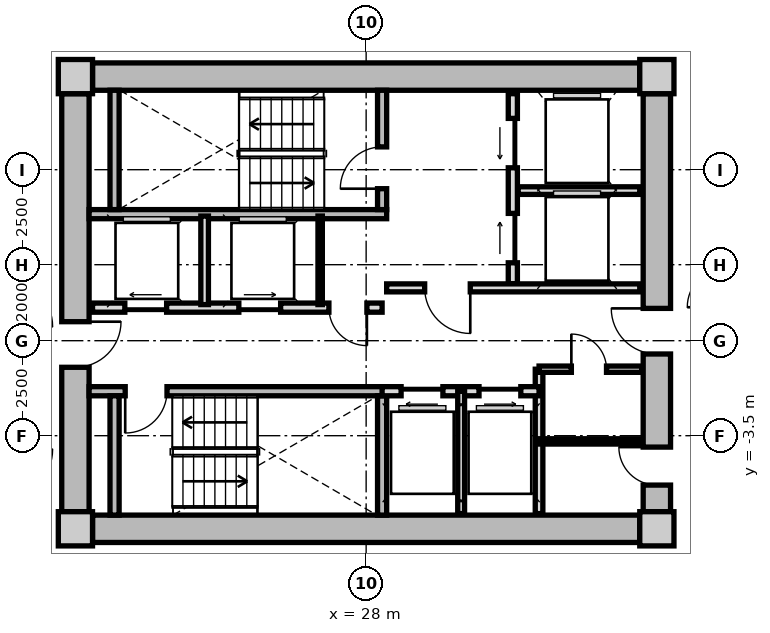
"""IFC4 building model, lengths in metres.
Left out: names, types, materials, properties, quantities, classifications, styles, units other than length and angle.
Written with IfcOpenShell. Run it as: python <this file> out.ifc"""

import sys

from ifc_helpers import new_model, si_unit, direction, frame, frame_2d, origin, origin_2d, place, context, subcontext, project, spatial, rectangle, extrude, source, transform, mapped, element, fill, save


model = new_model("IFC4")
c1 = context("Model", 3, precision=1e-05, world=origin(), true_north=direction((0.0, 1.0)))
c2 = subcontext(c1, "Body", "Model", "MODEL_VIEW")
j1 = project(units=[si_unit("LENGTHUNIT", "METRE"), si_unit("PLANEANGLEUNIT", "RADIAN")], contexts=[c1])
p1 = place(None, origin())
s1 = spatial("IfcSite", under=j1, at=p1, CompositionType="ELEMENT")
p2 = place(p1, origin())
s2 = spatial("IfcBuilding", under=s1, at=p2, CompositionType="ELEMENT")
p3 = place(p2, frame((0.0, 0.0, 77.95)))
s3 = spatial("IfcBuildingStorey", under=s2, at=p3, CompositionType="ELEMENT", Elevation=77.95)
m1 = source(origin(), c2, "Body", "SweptSolid", [
    extrude(rectangle(XDim=0.9, YDim=0.9, at=origin_2d()), origin(), (0.0, 0.0, 1.0), 3.05),
])
for number, where, z_axis, x_axis in (
    (1, (20.35, -5.95, 0.0), (0.0, 0.0, 1.0), (1.0, 0.0, 0.0)),
    (2, (35.65, -5.95, 0.0), (0.0, 0.0, 1.0), (1.0, 0.0, 0.0)),
    (3, (35.65, 5.95, 0.0), (0.0, 0.0, 1.0), (1.0, 0.0, 0.0)),
    (4, (20.35, 5.95, 0.0), (0.0, 0.0, 1.0), (1.0, 0.0, 0.0)),
):
    element("IfcColumn", number, at=place(p3, frame(where, z_axis=z_axis, x_axis=x_axis)), inside=s3, PredefinedType="COLUMN", context=c2, shape_type="MappedRepresentation", body=[
        mapped(m1, transform((0.0, 0.0, 0.0), x_axis=(1.0, 0.0, 0.0), y_axis=(0.0, 1.0, 0.0), z_axis=(0.0, 0.0, 1.0), scale=1.0)),
    ])
m2 = source(origin(), c2, "Body", "SweptSolid", [
    extrude(rectangle(XDim=14.4, YDim=0.72, at=frame_2d((7.2, 0.0))), origin(), (0.0, 0.0, 1.0), 2.79),
])
for number, where, z_axis, x_axis in (
    (5, (20.8, 5.95, 0.0), (0.0, 0.0, 1.0), (1.0, 0.0, 0.0)),
    (6, (35.2, -5.95, 0.0), (0.0, 0.0, 1.0), (-1.0, 0.0, 0.0)),
):
    element("IfcWall", number, at=place(p3, frame(where, z_axis=z_axis, x_axis=x_axis)), inside=s3, PredefinedType="SHEAR", context=c2, shape_type="MappedRepresentation", body=[
        mapped(m2, transform((0.0, 0.0, 0.0), x_axis=(1.0, 0.0, 0.0), y_axis=(0.0, 1.0, 0.0), z_axis=(0.0, 0.0, 1.0), scale=1.0)),
    ])
m3 = source(origin(), c2, "Body", "SweptSolid", [
    extrude(rectangle(XDim=11.0, YDim=0.72, at=frame_2d((5.5, 0.0))), origin(), (0.0, 0.0, 1.0), 2.79),
])
p4 = place(p3, frame((20.35, -5.5, 0.0), z_axis=(0.0, 0.0, 1.0), x_axis=(0.0, 1.0, 0.0)))
e7 = element("IfcWall", 7, at=p4, inside=s3, PredefinedType="SHEAR", context=c2, shape_type="MappedRepresentation", body=[
    mapped(m3, transform((0.0, 0.0, 0.0), x_axis=(1.0, 0.0, 0.0), y_axis=(0.0, 1.0, 0.0), z_axis=(0.0, 0.0, 1.0), scale=1.0)),
])
p5 = place(p4, frame((3.8, 0.0, 0.0)))
e8 = element("IfcOpeningElement", 8, at=p5, cuts=e7, PredefinedType="OPENING", context=c2, shape_type="SweptSolid", body=[
    extrude(rectangle(XDim=1.2, YDim=2.15, at=frame_2d((0.6, 1.075))), frame((0.0, 0.37, 0.0), z_axis=(0.0, -1.0, 0.0), x_axis=(1.0, 0.0, 0.0)), (0.0, 0.0, 1.0), 0.74),
])
p6 = place(p3, frame((35.65, 5.5, 0.0), z_axis=(0.0, 0.0, 1.0), x_axis=(0.0, -1.0, 0.0)))
e9 = element("IfcWall", 9, at=p6, inside=s3, PredefinedType="SHEAR", context=c2, shape_type="MappedRepresentation", body=[
    mapped(m3, transform((0.0, 0.0, 0.0), x_axis=(1.0, 0.0, 0.0), y_axis=(0.0, 1.0, 0.0), z_axis=(0.0, 0.0, 1.0), scale=1.0)),
])
p7 = place(p6, frame((5.65, 0.0, 0.0)))
e10 = element("IfcOpeningElement", 10, at=p7, cuts=e9, PredefinedType="OPENING", context=c2, shape_type="SweptSolid", body=[
    extrude(rectangle(XDim=1.2, YDim=2.15, at=frame_2d((0.6, 1.075))), frame((0.0, 0.37, 0.0), z_axis=(0.0, -1.0, 0.0), x_axis=(1.0, 0.0, 0.0)), (0.0, 0.0, 1.0), 0.74),
])
p8 = place(p6, frame((9.3, 0.0, 0.0)))
e11 = element("IfcOpeningElement", 11, at=p8, cuts=e9, PredefinedType="OPENING", context=c2, shape_type="SweptSolid", body=[
    extrude(rectangle(XDim=1.0, YDim=2.1, at=frame_2d((0.5, 1.05))), frame((0.0, 0.37, 0.0), z_axis=(0.0, -1.0, 0.0), x_axis=(1.0, 0.0, 0.0)), (0.0, 0.0, 1.0), 0.74),
])
m4 = source(origin(), c2, "Body", "SweptSolid", [
    extrude(rectangle(XDim=7.83, YDim=0.24, at=frame_2d((3.915, 0.0))), origin(), (0.0, 0.0, 1.0), 2.79),
])
p9 = place(p3, frame((20.71, 2.33, 0.0), z_axis=(0.0, 0.0, 1.0), x_axis=(1.0, 0.0, 0.0)))
e12 = element("IfcWall", 12, at=p9, inside=s3, PredefinedType="PARTITIONING", context=c2, shape_type="MappedRepresentation", body=[
    mapped(m4, transform((0.0, 0.0, 0.0), x_axis=(1.0, 0.0, 0.0), y_axis=(0.0, 1.0, 0.0), z_axis=(0.0, 0.0, 1.0), scale=1.0)),
])
m5 = source(origin(), c2, "Body", "SweptSolid", [
    extrude(rectangle(XDim=3.14, YDim=0.24, at=frame_2d((1.57, 0.0))), origin(), (0.0, 0.0, 1.0), 2.79),
])
p10 = place(p3, frame((21.38, 2.45, 0.0), z_axis=(0.0, 0.0, 1.0), x_axis=(0.0, 1.0, 0.0)))
e13 = element("IfcWall", 13, at=p10, inside=s3, PredefinedType="PARTITIONING", context=c2, shape_type="MappedRepresentation", body=[
    mapped(m5, transform((0.0, 0.0, 0.0), x_axis=(1.0, 0.0, 0.0), y_axis=(0.0, 1.0, 0.0), z_axis=(0.0, 0.0, 1.0), scale=1.0)),
])
p11 = place(p3, frame((28.42, 2.45, 0.0), z_axis=(0.0, 0.0, 1.0), x_axis=(0.0, 1.0, 0.0)))
e14 = element("IfcWall", 14, at=p11, inside=s3, PredefinedType="PARTITIONING", context=c2, shape_type="MappedRepresentation", body=[
    mapped(m5, transform((0.0, 0.0, 0.0), x_axis=(1.0, 0.0, 0.0), y_axis=(0.0, 1.0, 0.0), z_axis=(0.0, 0.0, 1.0), scale=1.0)),
])
p12 = place(p11, frame((0.55, 0.0, 0.0)))
e15 = element("IfcOpeningElement", 15, at=p12, cuts=e14, PredefinedType="OPENING", context=c2, shape_type="SweptSolid", body=[
    extrude(rectangle(XDim=1.1, YDim=2.15, at=frame_2d((0.55, 1.075))), frame((0.0, 0.13, 0.0), z_axis=(0.0, -1.0, 0.0), x_axis=(1.0, 0.0, 0.0)), (0.0, 0.0, 1.0), 0.26),
])
p13 = place(p3, frame((20.71, -2.33, 0.0), z_axis=(0.0, 0.0, 1.0), x_axis=(1.0, 0.0, 0.0)))
e16 = element("IfcWall", 16, at=p13, inside=s3, PredefinedType="PARTITIONING", context=c2, shape_type="MappedRepresentation", body=[
    mapped(m4, transform((0.0, 0.0, 0.0), x_axis=(1.0, 0.0, 0.0), y_axis=(0.0, 1.0, 0.0), z_axis=(0.0, 0.0, 1.0), scale=1.0)),
])
p14 = place(p13, frame((0.95, 0.0, 0.0)))
e17 = element("IfcOpeningElement", 17, at=p14, cuts=e16, PredefinedType="OPENING", context=c2, shape_type="SweptSolid", body=[
    extrude(rectangle(XDim=1.1, YDim=2.15, at=frame_2d((0.55, 1.075))), frame((0.0, 0.13, 0.0), z_axis=(0.0, -1.0, 0.0), x_axis=(1.0, 0.0, 0.0)), (0.0, 0.0, 1.0), 0.26),
])
for number, where, z_axis, x_axis in (
    (18, (21.38, -5.59, 0.0), (0.0, 0.0, 1.0), (0.0, 1.0, 0.0)),
    (19, (28.42, -5.59, 0.0), (0.0, 0.0, 1.0), (0.0, 1.0, 0.0)),
):
    element("IfcWall", number, at=place(p3, frame(where, z_axis=z_axis, x_axis=x_axis)), inside=s3, PredefinedType="PARTITIONING", context=c2, shape_type="MappedRepresentation", body=[
        mapped(m5, transform((0.0, 0.0, 0.0), x_axis=(1.0, 0.0, 0.0), y_axis=(0.0, 1.0, 0.0), z_axis=(0.0, 0.0, 1.0), scale=1.0)),
    ])
m6 = source(origin(), c2, "Body", "SweptSolid", [
    extrude(rectangle(XDim=5.0, YDim=0.24, at=frame_2d((2.5, 0.0))), origin(), (0.0, 0.0, 1.0), 2.775),
])
p15 = place(p3, frame((31.86, 0.5, 0.0), z_axis=(0.0, 0.0, 1.0), x_axis=(0.0, 1.0, 0.0)))
e20 = element("IfcWall", 20, at=p15, inside=s3, PredefinedType="PARTITIONING", context=c2, shape_type="MappedRepresentation", body=[
    mapped(m6, transform((0.0, 0.0, 0.0), x_axis=(1.0, 0.0, 0.0), y_axis=(0.0, 1.0, 0.0), z_axis=(0.0, 0.0, 1.0), scale=1.0)),
])
p16 = place(p15, frame((3.05, 0.0, 0.0)))
e21 = element("IfcOpeningElement", 21, at=p16, cuts=e20, PredefinedType="OPENING", context=c2, shape_type="SweptSolid", body=[
    extrude(rectangle(XDim=1.3, YDim=2.2, at=frame_2d((0.65, 1.1))), frame((0.0, 0.13, 0.0), z_axis=(0.0, -1.0, 0.0), x_axis=(1.0, 0.0, 0.0)), (0.0, 0.0, 1.0), 0.26),
])
p17 = place(p15, frame((0.55, 0.0, 0.0)))
e22 = element("IfcOpeningElement", 22, at=p17, cuts=e20, PredefinedType="OPENING", context=c2, shape_type="SweptSolid", body=[
    extrude(rectangle(XDim=1.3, YDim=2.2, at=frame_2d((0.65, 1.1))), frame((0.0, 0.13, 0.0), z_axis=(0.0, -1.0, 0.0), x_axis=(1.0, 0.0, 0.0)), (0.0, 0.0, 1.0), 0.26),
])
m7 = source(origin(), c2, "Body", "SweptSolid", [
    extrude(rectangle(XDim=3.2, YDim=0.2, at=frame_2d((1.6, 0.0))), origin(), (0.0, 0.0, 1.0), 2.775),
])
p18 = place(p3, frame((32.0, 2.95, 0.0), z_axis=(0.0, 0.0, 1.0), x_axis=(1.0, 0.0, 0.0)))
e23 = element("IfcWall", 23, at=p18, inside=s3, PredefinedType="PARTITIONING", context=c2, shape_type="MappedRepresentation", body=[
    mapped(m7, transform((0.0, 0.0, 0.0), x_axis=(1.0, 0.0, 0.0), y_axis=(0.0, 1.0, 0.0), z_axis=(0.0, 0.0, 1.0), scale=1.0)),
])
m8 = source(origin(), c2, "Body", "SweptSolid", [
    extrude(rectangle(XDim=6.66, YDim=0.21, at=frame_2d((3.33, 0.0))), origin(), (0.0, 0.0, 1.0), 2.775),
])
p19 = place(p3, frame((28.54, 0.39, 0.0), z_axis=(0.0, 0.0, 1.0), x_axis=(1.0, 0.0, 0.0)))
e24 = element("IfcWall", 24, at=p19, inside=s3, PredefinedType="PARTITIONING", context=c2, shape_type="MappedRepresentation", body=[
    mapped(m8, transform((0.0, 0.0, 0.0), x_axis=(1.0, 0.0, 0.0), y_axis=(0.0, 1.0, 0.0), z_axis=(0.0, 0.0, 1.0), scale=1.0)),
])
p20 = place(p19, frame((1.0, 0.0, 0.0)))
e25 = element("IfcOpeningElement", 25, at=p20, cuts=e24, PredefinedType="OPENING", context=c2, shape_type="SweptSolid", body=[
    extrude(rectangle(XDim=1.2, YDim=2.15, at=frame_2d((0.6, 1.075))), frame((0.0, 0.115, 0.0), z_axis=(0.0, -1.0, 0.0), x_axis=(1.0, 0.0, 0.0)), (0.0, 0.0, 1.0), 0.23),
])
m9 = source(origin(), c2, "Body", "SweptSolid", [
    extrude(rectangle(XDim=7.62, YDim=0.24, at=frame_2d((3.81, 0.0))), origin(), (0.0, 0.0, 1.0), 2.775),
])
p21 = place(p3, frame((20.8, -0.13, 0.0), z_axis=(0.0, 0.0, 1.0), x_axis=(1.0, 0.0, 0.0)))
e26 = element("IfcWall", 26, at=p21, inside=s3, PredefinedType="PARTITIONING", context=c2, shape_type="MappedRepresentation", body=[
    mapped(m9, transform((0.0, 0.0, 0.0), x_axis=(1.0, 0.0, 0.0), y_axis=(0.0, 1.0, 0.0), z_axis=(0.0, 0.0, 1.0), scale=1.0)),
])
p22 = place(p21, frame((6.22, 0.0, 0.0)))
e27 = element("IfcOpeningElement", 27, at=p22, cuts=e26, PredefinedType="OPENING", context=c2, shape_type="SweptSolid", body=[
    extrude(rectangle(XDim=1.0, YDim=2.1, at=frame_2d((0.5, 1.05))), frame((0.0, 0.13, 0.0), z_axis=(0.0, -1.0, 0.0), x_axis=(1.0, 0.0, 0.0)), (0.0, 0.0, 1.0), 0.26),
])
p23 = place(p21, frame((0.85, 0.0, 0.0)))
e28 = element("IfcOpeningElement", 28, at=p23, cuts=e26, PredefinedType="OPENING", context=c2, shape_type="SweptSolid", body=[
    extrude(rectangle(XDim=1.1, YDim=2.2, at=frame_2d((0.55, 1.1))), frame((0.0, 0.13, 0.0), z_axis=(0.0, -1.0, 0.0), x_axis=(1.0, 0.0, 0.0)), (0.0, 0.0, 1.0), 0.26),
])
p24 = place(p21, frame((3.85, 0.0, 0.0)))
e29 = element("IfcOpeningElement", 29, at=p24, cuts=e26, PredefinedType="OPENING", context=c2, shape_type="SweptSolid", body=[
    extrude(rectangle(XDim=1.1, YDim=2.2, at=frame_2d((0.55, 1.1))), frame((0.0, 0.13, 0.0), z_axis=(0.0, -1.0, 0.0), x_axis=(1.0, 0.0, 0.0)), (0.0, 0.0, 1.0), 0.26),
])
m10 = source(origin(), c2, "Body", "SweptSolid", [
    extrude(rectangle(XDim=2.33, YDim=0.115, at=frame_2d((1.165, 0.0))), origin(), (0.0, 0.0, 1.0), 2.775),
])
p25 = place(p3, frame((26.79, -0.05, 0.0), z_axis=(0.0, 0.0, 1.0), x_axis=(0.0, 1.0, 0.0)))
e30 = element("IfcWall", 30, at=p25, inside=s3, PredefinedType="PARTITIONING", context=c2, shape_type="MappedRepresentation", body=[
    mapped(m10, transform((0.0, 0.0, 0.0), x_axis=(1.0, 0.0, 0.0), y_axis=(0.0, 1.0, 0.0), z_axis=(0.0, 0.0, 1.0), scale=1.0)),
])
m11 = source(origin(), c2, "Body", "SweptSolid", [
    extrude(rectangle(XDim=2.33, YDim=0.2, at=frame_2d((1.165, 0.0))), origin(), (0.0, 0.0, 1.0), 2.775),
])
p26 = place(p3, frame((23.75, -0.05, 0.0), z_axis=(0.0, 0.0, 1.0), x_axis=(0.0, 1.0, 0.0)))
e31 = element("IfcWall", 31, at=p26, inside=s3, PredefinedType="PARTITIONING", context=c2, shape_type="MappedRepresentation", body=[
    mapped(m11, transform((0.0, 0.0, 0.0), x_axis=(1.0, 0.0, 0.0), y_axis=(0.0, 1.0, 0.0), z_axis=(0.0, 0.0, 1.0), scale=1.0)),
])
m12 = source(origin(), c2, "Body", "SweptSolid", [
    extrude(rectangle(XDim=3.8, YDim=0.2, at=frame_2d((1.9, 0.0))), origin(), (0.0, 0.0, 1.0), 2.775),
])
p27 = place(p3, frame((32.55, -5.55, 0.0), z_axis=(0.0, 0.0, 1.0), x_axis=(0.0, 1.0, 0.0)))
e32 = element("IfcWall", 32, at=p27, inside=s3, PredefinedType="PARTITIONING", context=c2, shape_type="MappedRepresentation", body=[
    mapped(m12, transform((0.0, 0.0, 0.0), x_axis=(1.0, 0.0, 0.0), y_axis=(0.0, 1.0, 0.0), z_axis=(0.0, 0.0, 1.0), scale=1.0)),
])
m13 = source(origin(), c2, "Body", "SweptSolid", [
    extrude(rectangle(XDim=4.13, YDim=0.24, at=frame_2d((2.065, 0.0))), origin(), (0.0, 0.0, 1.0), 2.775),
])
p28 = place(p3, frame((28.42, -2.33, 0.0), z_axis=(0.0, 0.0, 1.0), x_axis=(1.0, 0.0, 0.0)))
e33 = element("IfcWall", 33, at=p28, inside=s3, PredefinedType="PARTITIONING", context=c2, shape_type="MappedRepresentation", body=[
    mapped(m13, transform((0.0, 0.0, 0.0), x_axis=(1.0, 0.0, 0.0), y_axis=(0.0, 1.0, 0.0), z_axis=(0.0, 0.0, 1.0), scale=1.0)),
])
p29 = place(p28, frame((0.5, 0.0, 0.0)))
e34 = element("IfcOpeningElement", 34, at=p29, cuts=e33, PredefinedType="OPENING", context=c2, shape_type="SweptSolid", body=[
    extrude(rectangle(XDim=1.1, YDim=2.2, at=frame_2d((0.55, 1.1))), frame((0.0, 0.13, 0.0), z_axis=(0.0, -1.0, 0.0), x_axis=(1.0, 0.0, 0.0)), (0.0, 0.0, 1.0), 0.26),
])
p30 = place(p28, frame((2.55, 0.0, 0.0)))
e35 = element("IfcOpeningElement", 35, at=p30, cuts=e33, PredefinedType="OPENING", context=c2, shape_type="SweptSolid", body=[
    extrude(rectangle(XDim=1.1, YDim=2.2, at=frame_2d((0.55, 1.1))), frame((0.0, 0.13, 0.0), z_axis=(0.0, -1.0, 0.0), x_axis=(1.0, 0.0, 0.0)), (0.0, 0.0, 1.0), 0.26),
])
m14 = source(origin(), c2, "Body", "SweptSolid", [
    extrude(rectangle(XDim=3.22, YDim=0.18, at=frame_2d((1.61, 0.0))), origin(), (0.0, 0.0, 1.0), 2.775),
])
p31 = place(p3, frame((30.5, -5.55, 0.0), z_axis=(0.0, 0.0, 1.0), x_axis=(0.0, 1.0, 0.0)))
e36 = element("IfcWall", 36, at=p31, inside=s3, PredefinedType="PARTITIONING", context=c2, shape_type="MappedRepresentation", body=[
    mapped(m14, transform((0.0, 0.0, 0.0), x_axis=(1.0, 0.0, 0.0), y_axis=(0.0, 1.0, 0.0), z_axis=(0.0, 0.0, 1.0), scale=1.0)),
])
m15 = source(origin(), c2, "Body", "SweptSolid", [
    extrude(rectangle(XDim=2.7, YDim=0.165, at=frame_2d((1.35, 0.0))), origin(), (0.0, 0.0, 1.0), 2.775),
])
p32 = place(p3, frame((32.55, -1.75, 0.0), z_axis=(0.0, 0.0, 1.0), x_axis=(1.0, 0.0, 0.0)))
e37 = element("IfcWall", 37, at=p32, inside=s3, PredefinedType="PARTITIONING", context=c2, shape_type="MappedRepresentation", body=[
    mapped(m15, transform((0.0, 0.0, 0.0), x_axis=(1.0, 0.0, 0.0), y_axis=(0.0, 1.0, 0.0), z_axis=(0.0, 0.0, 1.0), scale=1.0)),
])
p33 = place(p32, frame((0.85, 0.0, 0.0)))
e38 = element("IfcOpeningElement", 38, at=p33, cuts=e37, PredefinedType="OPENING", context=c2, shape_type="SweptSolid", body=[
    extrude(rectangle(XDim=0.925, YDim=2.1, at=frame_2d((0.462, 1.05))), frame((0.0, 0.093, 0.0), z_axis=(0.0, -1.0, 0.0), x_axis=(1.0, 0.0, 0.0)), (0.0, 0.0, 1.0), 0.185),
])
m16 = source(origin(), c2, "Body", "SweptSolid", [
    extrude(rectangle(XDim=2.7, YDim=0.14, at=frame_2d((1.35, 0.0))), origin(), (0.0, 0.0, 1.0), 2.775),
])
p34 = place(p3, frame((32.55, -3.65, 0.0), z_axis=(0.0, 0.0, 1.0), x_axis=(1.0, 0.0, 0.0)))
e39 = element("IfcWall", 39, at=p34, inside=s3, PredefinedType="PARTITIONING", context=c2, shape_type="MappedRepresentation", body=[
    mapped(m16, transform((0.0, 0.0, 0.0), x_axis=(1.0, 0.0, 0.0), y_axis=(0.0, 1.0, 0.0), z_axis=(0.0, 0.0, 1.0), scale=1.0)),
])
m17 = source(origin(), c2, "Body", "SweptSolid", [
    extrude(rectangle(XDim=1.1, YDim=2.15, at=frame_2d((0.55, 1.075))), frame((0.0, 0.025, 0.0), z_axis=(0.0, -1.0, 0.0), x_axis=(1.0, 0.0, 0.0)), (0.0, 0.0, 1.0), 0.05),
])
p35 = place(p12, origin())
e40 = element("IfcDoor", 40, at=p35, inside=s3, OperationType="SINGLE_SWING_LEFT", PredefinedType="DOOR", context=c2, shape_type="MappedRepresentation", body=[
    mapped(m17, transform((0.0, 0.0, 0.0), x_axis=(1.0, 0.0, 0.0), y_axis=(0.0, 1.0, 0.0), z_axis=(0.0, 0.0, 1.0), scale=1.0)),
])
fill(e15, e40)
p36 = place(p14, frame((1.1, 0.0, 0.0), z_axis=(0.0, 0.0, 1.0), x_axis=(-1.0, 0.0, 0.0)))
e41 = element("IfcDoor", 41, at=p36, inside=s3, OperationType="SINGLE_SWING_RIGHT", PredefinedType="DOOR", context=c2, shape_type="MappedRepresentation", body=[
    mapped(m17, transform((0.0, 0.0, 0.0), x_axis=(1.0, 0.0, 0.0), y_axis=(0.0, 1.0, 0.0), z_axis=(0.0, 0.0, 1.0), scale=1.0)),
])
fill(e17, e41)
m18 = source(origin(), c2, "Body", "SweptSolid", [
    extrude(rectangle(XDim=1.3, YDim=2.2, at=frame_2d((0.65, 1.1))), frame((0.0, 0.025, 0.0), z_axis=(0.0, -1.0, 0.0), x_axis=(1.0, 0.0, 0.0)), (0.0, 0.0, 1.0), 0.05),
])
p37 = place(p16, origin())
e42 = element("IfcDoor", 42, at=p37, inside=s3, OperationType="SLIDING_TO_LEFT", PredefinedType="DOOR", context=c2, shape_type="MappedRepresentation", body=[
    mapped(m18, transform((0.0, 0.0, 0.0), x_axis=(1.0, 0.0, 0.0), y_axis=(0.0, 1.0, 0.0), z_axis=(0.0, 0.0, 1.0), scale=1.0)),
])
fill(e21, e42)
p38 = place(p17, origin())
e43 = element("IfcDoor", 43, at=p38, inside=s3, OperationType="SLIDING_TO_RIGHT", PredefinedType="DOOR", context=c2, shape_type="MappedRepresentation", body=[
    mapped(m18, transform((0.0, 0.0, 0.0), x_axis=(1.0, 0.0, 0.0), y_axis=(0.0, 1.0, 0.0), z_axis=(0.0, 0.0, 1.0), scale=1.0)),
])
fill(e22, e43)
m19 = source(origin(), c2, "Body", "SweptSolid", [
    extrude(rectangle(XDim=1.2, YDim=2.15, at=frame_2d((0.6, 1.075))), frame((0.0, 0.025, 0.0), z_axis=(0.0, -1.0, 0.0), x_axis=(1.0, 0.0, 0.0)), (0.0, 0.0, 1.0), 0.05),
])
p39 = place(p20, frame((1.2, 0.0, 0.0), z_axis=(0.0, 0.0, 1.0), x_axis=(-1.0, 0.0, 0.0)))
e44 = element("IfcDoor", 44, at=p39, inside=s3, OperationType="SINGLE_SWING_LEFT", PredefinedType="DOOR", context=c2, shape_type="MappedRepresentation", body=[
    mapped(m19, transform((0.0, 0.0, 0.0), x_axis=(1.0, 0.0, 0.0), y_axis=(0.0, 1.0, 0.0), z_axis=(0.0, 0.0, 1.0), scale=1.0)),
])
fill(e25, e44)
p40 = place(p5, frame((1.2, 0.0, 0.0), z_axis=(0.0, 0.0, 1.0), x_axis=(-1.0, 0.0, 0.0)))
e45 = element("IfcDoor", 45, at=p40, inside=s3, OperationType="SINGLE_SWING_LEFT", PredefinedType="DOOR", context=c2, shape_type="MappedRepresentation", body=[
    mapped(m19, transform((0.0, 0.0, 0.0), x_axis=(1.0, 0.0, 0.0), y_axis=(0.0, 1.0, 0.0), z_axis=(0.0, 0.0, 1.0), scale=1.0)),
])
fill(e8, e45)
p41 = place(p7, frame((1.2, 0.0, 0.0), z_axis=(0.0, 0.0, 1.0), x_axis=(-1.0, 0.0, 0.0)))
e46 = element("IfcDoor", 46, at=p41, inside=s3, OperationType="SINGLE_SWING_RIGHT", PredefinedType="DOOR", context=c2, shape_type="MappedRepresentation", body=[
    mapped(m19, transform((0.0, 0.0, 0.0), x_axis=(1.0, 0.0, 0.0), y_axis=(0.0, 1.0, 0.0), z_axis=(0.0, 0.0, 1.0), scale=1.0)),
])
fill(e10, e46)
m20 = source(origin(), c2, "Body", "SweptSolid", [
    extrude(rectangle(XDim=1.0, YDim=2.1, at=frame_2d((0.5, 1.05))), frame((0.0, 0.025, 0.0), z_axis=(0.0, -1.0, 0.0), x_axis=(1.0, 0.0, 0.0)), (0.0, 0.0, 1.0), 0.05),
])
p42 = place(p22, frame((1.0, 0.0, 0.0), z_axis=(0.0, 0.0, 1.0), x_axis=(-1.0, 0.0, 0.0)))
e47 = element("IfcDoor", 47, at=p42, inside=s3, OperationType="SINGLE_SWING_LEFT", PredefinedType="DOOR", context=c2, shape_type="MappedRepresentation", body=[
    mapped(m20, transform((0.0, 0.0, 0.0), x_axis=(1.0, 0.0, 0.0), y_axis=(0.0, 1.0, 0.0), z_axis=(0.0, 0.0, 1.0), scale=1.0)),
])
fill(e27, e47)
m21 = source(origin(), c2, "Body", "SweptSolid", [
    extrude(rectangle(XDim=1.1, YDim=2.2, at=frame_2d((0.55, 1.1))), frame((0.0, 0.025, 0.0), z_axis=(0.0, -1.0, 0.0), x_axis=(1.0, 0.0, 0.0)), (0.0, 0.0, 1.0), 0.05),
])
p43 = place(p23, origin())
e48 = element("IfcDoor", 48, at=p43, inside=s3, OperationType="SLIDING_TO_LEFT", PredefinedType="DOOR", context=c2, shape_type="MappedRepresentation", body=[
    mapped(m21, transform((0.0, 0.0, 0.0), x_axis=(1.0, 0.0, 0.0), y_axis=(0.0, 1.0, 0.0), z_axis=(0.0, 0.0, 1.0), scale=1.0)),
])
fill(e28, e48)
p44 = place(p24, origin())
e49 = element("IfcDoor", 49, at=p44, inside=s3, OperationType="SLIDING_TO_RIGHT", PredefinedType="DOOR", context=c2, shape_type="MappedRepresentation", body=[
    mapped(m21, transform((0.0, 0.0, 0.0), x_axis=(1.0, 0.0, 0.0), y_axis=(0.0, 1.0, 0.0), z_axis=(0.0, 0.0, 1.0), scale=1.0)),
])
fill(e29, e49)
p45 = place(p29, frame((1.1, 0.0, 0.0), z_axis=(0.0, 0.0, 1.0), x_axis=(-1.0, 0.0, 0.0)))
e50 = element("IfcDoor", 50, at=p45, inside=s3, OperationType="SLIDING_TO_LEFT", PredefinedType="DOOR", context=c2, shape_type="MappedRepresentation", body=[
    mapped(m21, transform((0.0, 0.0, 0.0), x_axis=(1.0, 0.0, 0.0), y_axis=(0.0, 1.0, 0.0), z_axis=(0.0, 0.0, 1.0), scale=1.0)),
])
fill(e34, e50)
p46 = place(p30, frame((1.1, 0.0, 0.0), z_axis=(0.0, 0.0, 1.0), x_axis=(-1.0, 0.0, 0.0)))
e51 = element("IfcDoor", 51, at=p46, inside=s3, OperationType="SLIDING_TO_RIGHT", PredefinedType="DOOR", context=c2, shape_type="MappedRepresentation", body=[
    mapped(m21, transform((0.0, 0.0, 0.0), x_axis=(1.0, 0.0, 0.0), y_axis=(0.0, 1.0, 0.0), z_axis=(0.0, 0.0, 1.0), scale=1.0)),
])
fill(e35, e51)
m22 = source(origin(), c2, "Body", "SweptSolid", [
    extrude(rectangle(XDim=0.925, YDim=2.1, at=frame_2d((0.462, 1.05))), frame((0.0, 0.025, 0.0), z_axis=(0.0, -1.0, 0.0), x_axis=(1.0, 0.0, 0.0)), (0.0, 0.0, 1.0), 0.05),
])
p47 = place(p33, origin())
e52 = element("IfcDoor", 52, at=p47, inside=s3, OperationType="SINGLE_SWING_LEFT", PredefinedType="DOOR", context=c2, shape_type="MappedRepresentation", body=[
    mapped(m22, transform((0.0, 0.0, 0.0), x_axis=(1.0, 0.0, 0.0), y_axis=(0.0, 1.0, 0.0), z_axis=(0.0, 0.0, 1.0), scale=1.0)),
])
fill(e38, e52)
p48 = place(p8, frame((1.0, 0.0, 0.0), z_axis=(0.0, 0.0, 1.0), x_axis=(-1.0, 0.0, 0.0)))
e53 = element("IfcDoor", 53, at=p48, inside=s3, OperationType="SINGLE_SWING_RIGHT", PredefinedType="DOOR", context=c2, shape_type="MappedRepresentation", body=[
    mapped(m20, transform((0.0, 0.0, 0.0), x_axis=(1.0, 0.0, 0.0), y_axis=(0.0, 1.0, 0.0), z_axis=(0.0, 0.0, 1.0), scale=1.0)),
])
fill(e11, e53)
save(model, sys.argv[1])
